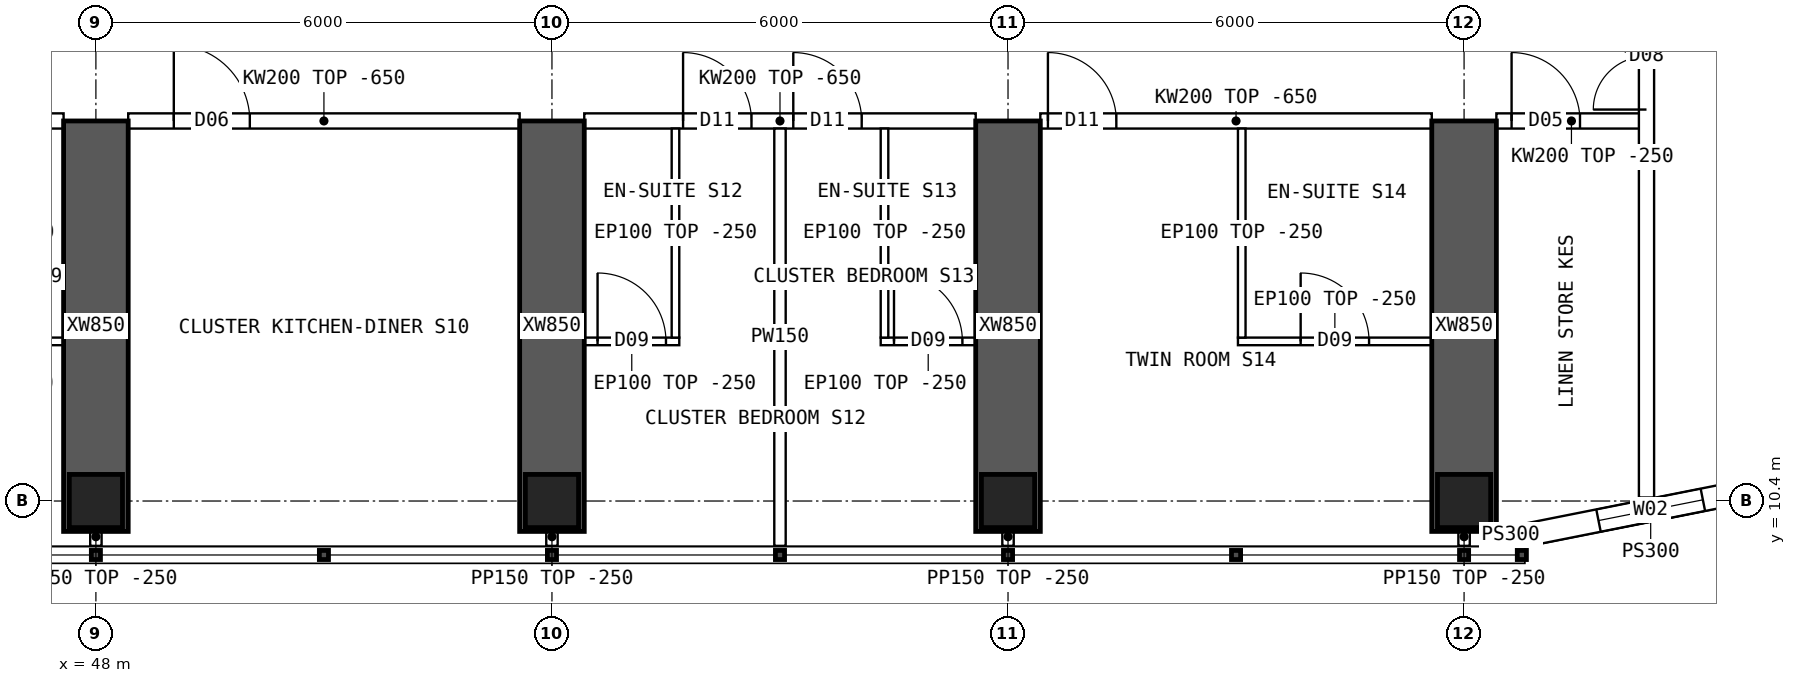
"""IFC4 building model, lengths in metres.
Left out: names, types, materials, properties, quantities, classifications, styles, units other than length and angle.
Written with IfcOpenShell. Run it as: python <this file> out.ifc"""

import sys

from ifc_helpers import new_model, si_unit, direction, frame, frame_2d, origin, origin_2d, place, context, subcontext, project, spatial, polyline, rectangle, hollow_rectangle, outline, extrude, element, fill, save


model = new_model("IFC4")
c1 = context("Model", 3, precision=1e-05, world=origin(), true_north=direction((0.0, 1.0)))
c2 = subcontext(c1, "Body", "Model", "MODEL_VIEW")
j1 = project(units=[si_unit("LENGTHUNIT", "METRE"), si_unit("PLANEANGLEUNIT", "RADIAN")], contexts=[c1])
p1 = place(None, origin())
s1 = spatial("IfcSite", under=j1, at=p1, CompositionType="ELEMENT")
p2 = place(p1, origin())
s2 = spatial("IfcBuilding", under=s1, at=p2, CompositionType="ELEMENT")
p3 = place(p2, frame((0.0, 0.0, 171.1)))
s3 = spatial("IfcBuildingStorey", under=s2, at=p3, CompositionType="ELEMENT", Elevation=171.1)
for number, where, z_axis, x_axis in (
    (1, (48.0, 10.4, 0.0), (0.0, 0.0, 1.0), (1.0, 0.0, 0.0)),
    (2, (54.0, 10.4, 0.0), (0.0, 0.0, 1.0), (1.0, 0.0, 0.0)),
    (3, (60.0, 10.4, 0.0), (0.0, 0.0, 1.0), (1.0, 0.0, 0.0)),
    (4, (66.0, 10.4, 0.0), (0.0, 0.0, 1.0), (1.0, 0.0, 0.0)),
):
    element("IfcColumn", number, at=place(p3, frame(where, z_axis=z_axis, x_axis=x_axis)), inside=s3, PredefinedType="COLUMN", context=c2, shape_type="SweptSolid", body=[
        extrude(hollow_rectangle(XDim=0.7, YDim=0.7, WallThickness=0.07, at=origin_2d()), origin(), (0.0, 0.0, 1.0), 3.75),
    ])
for number, where, z_axis, x_axis in (
    (5, (48.0, 10.0, 0.0), (0.0, 0.0, 1.0), (0.0, 1.0, 0.0)),
    (6, (54.0, 10.0, 0.0), (0.0, 0.0, 1.0), (0.0, 1.0, 0.0)),
    (7, (60.0, 10.0, 0.0), (0.0, 0.0, 1.0), (0.0, 1.0, 0.0)),
    (8, (66.0, 10.0, 0.0), (0.0, 0.0, 1.0), (0.0, 1.0, 0.0)),
):
    element("IfcWall", number, at=place(p3, frame(where, z_axis=z_axis, x_axis=x_axis)), inside=s3, PredefinedType="SHEAR", context=c2, shape_type="SweptSolid", body=[
        extrude(rectangle(XDim=5.4, YDim=0.85, at=frame_2d((2.7, 0.0))), origin(), (0.0, 0.0, 1.0), 3.75),
    ])
p4 = place(p3, frame((66.8, 9.95, 0.0), z_axis=(0.0, 0.0, 1.0), x_axis=(0.98078325777, 0.195100490205, 0.0)))
e9 = element("IfcWall", 9, at=p4, inside=s3, PredefinedType="SOLIDWALL", context=c2, shape_type="SweptSolid", body=[
    extrude(outline(polyline([(-0.03, -0.15), (3.405, -0.15), (3.345, 0.15), (0.03, 0.15), (-0.03, -0.15)])), origin(), (0.0, 0.0, 1.0), 3.5),
])
p5 = place(p4, frame((0.988, 0.0, 0.9)))
e10 = element("IfcOpeningElement", 10, at=p5, cuts=e9, PredefinedType="OPENING", context=c2, shape_type="SweptSolid", body=[
    extrude(rectangle(XDim=1.4, YDim=1.8, at=frame_2d((0.7, 0.9))), frame((0.0, 0.16, 0.0), z_axis=(0.0, -1.0, 0.0), x_axis=(1.0, 0.0, 0.0)), (0.0, 0.0, 1.0), 0.32),
])
p6 = place(p3, frame((66.8, 9.95, 0.0), z_axis=(0.0, 0.0, 1.0), x_axis=(-1.0, 0.0, 0.0)))
e11 = element("IfcWall", 11, at=p6, inside=s3, PredefinedType="SOLIDWALL", context=c2, shape_type="SweptSolid", body=[
    extrude(rectangle(XDim=0.375, YDim=0.3, at=frame_2d((0.188, 0.0))), origin(), (0.0, 0.0, 1.0), 3.5),
])
p7 = place(p3, frame((42.425, 15.4, 0.0), z_axis=(0.0, 0.0, 1.0), x_axis=(1.0, 0.0, 0.0)))
e12 = element("IfcWall", 12, at=p7, inside=s3, PredefinedType="SOLIDWALL", context=c2, shape_type="SweptSolid", body=[
    extrude(outline(polyline([(0.0, 0.0), (5.15, 0.0), (5.15, 3.1), (0.0, 3.1), (0.0, 0.0)])), frame((0.0, 0.1, 0.0), z_axis=(0.0, -1.0, 0.0), x_axis=(1.0, 0.0, 0.0)), (0.0, 0.0, 1.0), 0.2),
])
p8 = place(p7, frame((1.3, 0.0, 0.0)))
e13 = element("IfcOpeningElement", 13, at=p8, cuts=e12, PredefinedType="OPENING", context=c2, shape_type="SweptSolid", body=[
    extrude(rectangle(XDim=0.9, YDim=2.1, at=frame_2d((0.45, 1.05))), frame((0.0, 0.11, 0.0), z_axis=(0.0, -1.0, 0.0), x_axis=(1.0, 0.0, 0.0)), (0.0, 0.0, 1.0), 0.22),
])
p9 = place(p7, frame((2.75, 0.0, 0.0)))
e14 = element("IfcOpeningElement", 14, at=p9, cuts=e12, PredefinedType="OPENING", context=c2, shape_type="SweptSolid", body=[
    extrude(rectangle(XDim=0.9, YDim=2.1, at=frame_2d((0.45, 1.05))), frame((0.0, 0.11, 0.0), z_axis=(0.0, -1.0, 0.0), x_axis=(1.0, 0.0, 0.0)), (0.0, 0.0, 1.0), 0.22),
])
p10 = place(p3, frame((48.425, 15.4, 0.0), z_axis=(0.0, 0.0, 1.0), x_axis=(1.0, 0.0, 0.0)))
e15 = element("IfcWall", 15, at=p10, inside=s3, PredefinedType="SOLIDWALL", context=c2, shape_type="SweptSolid", body=[
    extrude(outline(polyline([(0.0, 0.0), (5.15, 0.0), (5.15, 3.1), (0.0, 3.1), (0.0, 0.0)])), frame((0.0, 0.1, 0.0), z_axis=(0.0, -1.0, 0.0), x_axis=(1.0, 0.0, 0.0)), (0.0, 0.0, 1.0), 0.2),
])
p11 = place(p10, frame((0.6, 0.0, 0.0)))
e16 = element("IfcOpeningElement", 16, at=p11, cuts=e15, PredefinedType="OPENING", context=c2, shape_type="SweptSolid", body=[
    extrude(rectangle(XDim=1.0, YDim=2.1, at=frame_2d((0.5, 1.05))), frame((0.0, 0.11, 0.0), z_axis=(0.0, -1.0, 0.0), x_axis=(1.0, 0.0, 0.0)), (0.0, 0.0, 1.0), 0.22),
])
p12 = place(p3, frame((54.425, 15.4, 0.0), z_axis=(0.0, 0.0, 1.0), x_axis=(1.0, 0.0, 0.0)))
e17 = element("IfcWall", 17, at=p12, inside=s3, PredefinedType="SOLIDWALL", context=c2, shape_type="SweptSolid", body=[
    extrude(outline(polyline([(0.0, 0.0), (5.15, 0.0), (5.15, 3.1), (0.0, 3.1), (0.0, 0.0)])), frame((0.0, 0.1, 0.0), z_axis=(0.0, -1.0, 0.0), x_axis=(1.0, 0.0, 0.0)), (0.0, 0.0, 1.0), 0.2),
])
p13 = place(p12, frame((1.3, 0.0, 0.0)))
e18 = element("IfcOpeningElement", 18, at=p13, cuts=e17, PredefinedType="OPENING", context=c2, shape_type="SweptSolid", body=[
    extrude(rectangle(XDim=0.9, YDim=2.1, at=frame_2d((0.45, 1.05))), frame((0.0, 0.11, 0.0), z_axis=(0.0, -1.0, 0.0), x_axis=(1.0, 0.0, 0.0)), (0.0, 0.0, 1.0), 0.22),
])
p14 = place(p12, frame((2.75, 0.0, 0.0)))
e19 = element("IfcOpeningElement", 19, at=p14, cuts=e17, PredefinedType="OPENING", context=c2, shape_type="SweptSolid", body=[
    extrude(rectangle(XDim=0.9, YDim=2.1, at=frame_2d((0.45, 1.05))), frame((0.0, 0.11, 0.0), z_axis=(0.0, -1.0, 0.0), x_axis=(1.0, 0.0, 0.0)), (0.0, 0.0, 1.0), 0.22),
])
p15 = place(p3, frame((60.425, 15.4, 0.0), z_axis=(0.0, 0.0, 1.0), x_axis=(1.0, 0.0, 0.0)))
e20 = element("IfcWall", 20, at=p15, inside=s3, PredefinedType="SOLIDWALL", context=c2, shape_type="SweptSolid", body=[
    extrude(outline(polyline([(0.0, 0.0), (5.15, 0.0), (5.15, 3.1), (0.0, 3.1), (0.0, 0.0)])), frame((0.0, 0.1, 0.0), z_axis=(0.0, -1.0, 0.0), x_axis=(1.0, 0.0, 0.0)), (0.0, 0.0, 1.0), 0.2),
])
p16 = place(p15, frame((0.1, 0.0, 0.0)))
e21 = element("IfcOpeningElement", 21, at=p16, cuts=e20, PredefinedType="OPENING", context=c2, shape_type="SweptSolid", body=[
    extrude(rectangle(XDim=0.9, YDim=2.1, at=frame_2d((0.45, 1.05))), frame((0.0, 0.11, 0.0), z_axis=(0.0, -1.0, 0.0), x_axis=(1.0, 0.0, 0.0)), (0.0, 0.0, 1.0), 0.22),
])
p17 = place(p3, frame((66.425, 15.4, 0.0), z_axis=(0.0, 0.0, 1.0), x_axis=(1.0, 0.0, 0.0)))
e22 = element("IfcWall", 22, at=p17, inside=s3, PredefinedType="SOLIDWALL", context=c2, shape_type="SweptSolid", body=[
    extrude(rectangle(XDim=1.975, YDim=0.2, at=frame_2d((0.987, 0.0))), origin(), (0.0, 0.0, 1.0), 3.5),
])
p18 = place(p17, frame((0.2, 0.0, 0.0)))
e23 = element("IfcOpeningElement", 23, at=p18, cuts=e22, PredefinedType="OPENING", context=c2, shape_type="SweptSolid", body=[
    extrude(rectangle(XDim=0.9, YDim=2.1, at=frame_2d((0.45, 1.05))), frame((0.0, 0.11, 0.0), z_axis=(0.0, -1.0, 0.0), x_axis=(1.0, 0.0, 0.0)), (0.0, 0.0, 1.0), 0.22),
])
p19 = place(p3, frame((47.575, 12.5, 0.0), z_axis=(0.0, 0.0, 1.0), x_axis=(-1.0, 0.0, 0.0)))
e24 = element("IfcWall", 24, at=p19, inside=s3, PredefinedType="PARTITIONING", context=c2, shape_type="SweptSolid", body=[
    extrude(rectangle(XDim=1.25, YDim=0.1, at=frame_2d((0.625, 0.0))), origin(), (0.0, 0.0, 1.0), 3.5),
])
p20 = place(p19, frame((0.175, 0.0, 0.0)))
e25 = element("IfcOpeningElement", 25, at=p20, cuts=e24, PredefinedType="OPENING", context=c2, shape_type="SweptSolid", body=[
    extrude(rectangle(XDim=0.9, YDim=2.1, at=frame_2d((0.45, 1.05))), frame((0.0, 0.06, 0.0), z_axis=(0.0, -1.0, 0.0), x_axis=(1.0, 0.0, 0.0)), (0.0, 0.0, 1.0), 0.12),
])
p21 = place(p3, frame((57.0, 9.81, 0.0), z_axis=(0.0, 0.0, 1.0), x_axis=(0.0, 1.0, 0.0)))
e26 = element("IfcWall", 26, at=p21, inside=s3, PredefinedType="PARTITIONING", context=c2, shape_type="SweptSolid", body=[
    extrude(outline(polyline([(0.0, 0.0), (5.49, 0.0), (5.49, 3.1), (5.442, 3.1), (5.44, 3.5), (0.792, 3.5), (0.79, 3.1), (0.392, 3.1), (0.39, 3.5), (0.0, 3.5), (0.0, 0.0)])), frame((0.0, 0.075, 0.0), z_axis=(0.0, -1.0, 0.0), x_axis=(1.0, 0.0, 0.0)), (0.0, 0.0, 1.0), 0.15),
])
p22 = place(p3, frame((55.675, 12.5, 0.0), z_axis=(0.0, 0.0, 1.0), x_axis=(-1.0, 0.0, 0.0)))
e27 = element("IfcWall", 27, at=p22, inside=s3, PredefinedType="PARTITIONING", context=c2, shape_type="SweptSolid", body=[
    extrude(rectangle(XDim=1.25, YDim=0.1, at=frame_2d((0.625, 0.0))), origin(), (0.0, 0.0, 1.0), 3.5),
])
p23 = place(p22, frame((0.175, 0.0, 0.0)))
e28 = element("IfcOpeningElement", 28, at=p23, cuts=e27, PredefinedType="OPENING", context=c2, shape_type="SweptSolid", body=[
    extrude(rectangle(XDim=0.9, YDim=2.1, at=frame_2d((0.45, 1.05))), frame((0.0, 0.06, 0.0), z_axis=(0.0, -1.0, 0.0), x_axis=(1.0, 0.0, 0.0)), (0.0, 0.0, 1.0), 0.12),
])
p24 = place(p3, frame((55.625, 12.55, 0.0), z_axis=(0.0, 0.0, 1.0), x_axis=(0.0, 1.0, 0.0)))
e29 = element("IfcWall", 29, at=p24, inside=s3, PredefinedType="PARTITIONING", context=c2, shape_type="SweptSolid", body=[
    extrude(outline(polyline([(0.0, 0.0), (2.75, 0.0), (2.75, 3.1), (2.702, 3.1), (2.7, 3.5), (0.0, 3.5), (0.0, 0.0)])), frame((0.0, 0.05, 0.0), z_axis=(0.0, -1.0, 0.0), x_axis=(1.0, 0.0, 0.0)), (0.0, 0.0, 1.0), 0.1),
])
p25 = place(p3, frame((59.575, 12.5, 0.0), z_axis=(0.0, 0.0, 1.0), x_axis=(-1.0, 0.0, 0.0)))
e30 = element("IfcWall", 30, at=p25, inside=s3, PredefinedType="PARTITIONING", context=c2, shape_type="SweptSolid", body=[
    extrude(rectangle(XDim=1.25, YDim=0.1, at=frame_2d((0.625, 0.0))), origin(), (0.0, 0.0, 1.0), 3.5),
])
p26 = place(p25, frame((0.175, 0.0, 0.0)))
e31 = element("IfcOpeningElement", 31, at=p26, cuts=e30, PredefinedType="OPENING", context=c2, shape_type="SweptSolid", body=[
    extrude(rectangle(XDim=0.9, YDim=2.1, at=frame_2d((0.45, 1.05))), frame((0.0, 0.06, 0.0), z_axis=(0.0, -1.0, 0.0), x_axis=(1.0, 0.0, 0.0)), (0.0, 0.0, 1.0), 0.12),
])
p27 = place(p3, frame((58.375, 12.55, 0.0), z_axis=(0.0, 0.0, 1.0), x_axis=(0.0, 1.0, 0.0)))
e32 = element("IfcWall", 32, at=p27, inside=s3, PredefinedType="PARTITIONING", context=c2, shape_type="SweptSolid", body=[
    extrude(outline(polyline([(0.0, 0.0), (2.75, 0.0), (2.75, 3.1), (2.702, 3.1), (2.7, 3.5), (0.0, 3.5), (0.0, 0.0)])), frame((0.0, 0.05, 0.0), z_axis=(0.0, -1.0, 0.0), x_axis=(1.0, 0.0, 0.0)), (0.0, 0.0, 1.0), 0.1),
])
p28 = place(p3, frame((65.575, 12.5, 0.0), z_axis=(0.0, 0.0, 1.0), x_axis=(-1.0, 0.0, 0.0)))
e33 = element("IfcWall", 33, at=p28, inside=s3, PredefinedType="PARTITIONING", context=c2, shape_type="SweptSolid", body=[
    extrude(rectangle(XDim=2.55, YDim=0.1, at=frame_2d((1.275, 0.0))), origin(), (0.0, 0.0, 1.0), 3.5),
])
p29 = place(p28, frame((0.825, 0.0, 0.0)))
e34 = element("IfcOpeningElement", 34, at=p29, cuts=e33, PredefinedType="OPENING", context=c2, shape_type="SweptSolid", body=[
    extrude(rectangle(XDim=0.9, YDim=2.1, at=frame_2d((0.45, 1.05))), frame((0.0, 0.06, 0.0), z_axis=(0.0, -1.0, 0.0), x_axis=(1.0, 0.0, 0.0)), (0.0, 0.0, 1.0), 0.12),
])
p30 = place(p3, frame((63.075, 12.55, 0.0), z_axis=(0.0, 0.0, 1.0), x_axis=(0.0, 1.0, 0.0)))
e35 = element("IfcWall", 35, at=p30, inside=s3, PredefinedType="PARTITIONING", context=c2, shape_type="SweptSolid", body=[
    extrude(outline(polyline([(0.0, 0.0), (2.75, 0.0), (2.75, 3.1), (2.702, 3.1), (2.7, 3.5), (0.0, 3.5), (0.0, 0.0)])), frame((0.0, 0.05, 0.0), z_axis=(0.0, -1.0, 0.0), x_axis=(1.0, 0.0, 0.0)), (0.0, 0.0, 1.0), 0.1),
])
p31 = place(p3, frame((68.4, 10.446, 0.0), z_axis=(0.0, 0.0, 1.0), x_axis=(0.0, 1.0, 0.0)))
e36 = element("IfcWall", 36, at=p31, inside=s3, PredefinedType="SOLIDWALL", context=c2, shape_type="SweptSolid", body=[
    extrude(rectangle(XDim=43.107, YDim=0.2, at=frame_2d((21.554, 0.0))), origin(), (0.0, 0.0, 1.0), 3.5),
])
p32 = place(p31, frame((13.914, 0.0, 0.0)))
e37 = element("IfcOpeningElement", 37, at=p32, cuts=e36, PredefinedType="OPENING", context=c2, shape_type="SweptSolid", body=[
    extrude(rectangle(XDim=1.2, YDim=2.1, at=frame_2d((0.6, 1.05))), frame((0.0, 0.11, 0.0), z_axis=(0.0, -1.0, 0.0), x_axis=(1.0, 0.0, 0.0)), (0.0, 0.0, 1.0), 0.22),
])
p33 = place(p31, frame((22.634, 0.0, 0.0)))
e38 = element("IfcOpeningElement", 38, at=p33, cuts=e36, PredefinedType="OPENING", context=c2, shape_type="SweptSolid", body=[
    extrude(rectangle(XDim=1.2, YDim=2.1, at=frame_2d((0.6, 1.05))), frame((0.0, 0.11, 0.0), z_axis=(0.0, -1.0, 0.0), x_axis=(1.0, 0.0, 0.0)), (0.0, 0.0, 1.0), 0.22),
])
p34 = place(p31, frame((5.104, 0.0, 0.0)))
e39 = element("IfcOpeningElement", 39, at=p34, cuts=e36, PredefinedType="OPENING", context=c2, shape_type="SweptSolid", body=[
    extrude(rectangle(XDim=1.4, YDim=2.1, at=frame_2d((0.7, 1.05))), frame((0.0, 0.11, 0.0), z_axis=(0.0, -1.0, 0.0), x_axis=(1.0, 0.0, 0.0)), (0.0, 0.0, 1.0), 0.22),
])
p35 = place(p31, frame((36.504, 0.0, 0.0)))
e40 = element("IfcOpeningElement", 40, at=p35, cuts=e36, PredefinedType="OPENING", context=c2, shape_type="SweptSolid", body=[
    extrude(rectangle(XDim=1.4, YDim=2.1, at=frame_2d((0.7, 1.05))), frame((0.0, 0.11, 0.0), z_axis=(0.0, -1.0, 0.0), x_axis=(1.0, 0.0, 0.0)), (0.0, 0.0, 1.0), 0.22),
])
for number, where, z_axis, x_axis in (
    (41, (48.0, 10.05, 0.0), (0.0, 0.0, 1.0), (0.0, -1.0, 0.0)),
    (42, (54.0, 10.05, 0.0), (0.0, 0.0, 1.0), (0.0, -1.0, 0.0)),
    (43, (60.0, 10.05, 0.0), (0.0, 0.0, 1.0), (0.0, -1.0, 0.0)),
    (44, (66.0, 10.05, 0.0), (0.0, 0.0, 1.0), (0.0, -1.0, 0.0)),
):
    element("IfcWall", number, at=place(p3, frame(where, z_axis=z_axis, x_axis=x_axis)), inside=s3, PredefinedType="PARTITIONING", context=c2, shape_type="SweptSolid", body=[
        extrude(rectangle(XDim=0.24, YDim=0.15, at=frame_2d((0.12, 0.0))), origin(), (0.0, 0.0, 1.0), 3.5),
    ])
p36 = place(p5, origin())
e45 = element("IfcWindow", 45, at=p36, inside=s3, PartitioningType="SINGLE_PANEL", PredefinedType="WINDOW", context=c2, shape_type="SweptSolid", body=[
    extrude(rectangle(XDim=1.4, YDim=1.8, at=frame_2d((0.7, 0.9))), frame((0.0, 0.03, 0.0), z_axis=(0.0, -1.0, 0.0), x_axis=(1.0, 0.0, 0.0)), (0.0, 0.0, 1.0), 0.06),
])
fill(e10, e45)
p37 = place(p11, origin())
e46 = element("IfcDoor", 46, at=p37, inside=s3, OperationType="SINGLE_SWING_LEFT", PredefinedType="DOOR", context=c2, shape_type="SweptSolid", body=[
    extrude(rectangle(XDim=1.0, YDim=2.1, at=frame_2d((0.5, 1.05))), frame((0.0, 0.025, 0.0), z_axis=(0.0, -1.0, 0.0), x_axis=(1.0, 0.0, 0.0)), (0.0, 0.0, 1.0), 0.05),
])
fill(e16, e46)
p38 = place(p23, origin())
e47 = element("IfcDoor", 47, at=p38, inside=s3, OperationType="SINGLE_SWING_RIGHT", PredefinedType="DOOR", context=c2, shape_type="SweptSolid", body=[
    extrude(rectangle(XDim=0.9, YDim=2.1, at=frame_2d((0.45, 1.05))), frame((0.0, 0.025, 0.0), z_axis=(0.0, -1.0, 0.0), x_axis=(1.0, 0.0, 0.0)), (0.0, 0.0, 1.0), 0.05),
])
fill(e28, e47)
p39 = place(p13, origin())
e48 = element("IfcDoor", 48, at=p39, inside=s3, OperationType="SINGLE_SWING_LEFT", PredefinedType="DOOR", context=c2, shape_type="SweptSolid", body=[
    extrude(rectangle(XDim=0.9, YDim=2.1, at=frame_2d((0.45, 1.05))), frame((0.0, 0.025, 0.0), z_axis=(0.0, -1.0, 0.0), x_axis=(1.0, 0.0, 0.0)), (0.0, 0.0, 1.0), 0.05),
])
fill(e18, e48)
p40 = place(p26, origin())
e49 = element("IfcDoor", 49, at=p40, inside=s3, OperationType="SINGLE_SWING_RIGHT", PredefinedType="DOOR", context=c2, shape_type="SweptSolid", body=[
    extrude(rectangle(XDim=0.9, YDim=2.1, at=frame_2d((0.45, 1.05))), frame((0.0, 0.025, 0.0), z_axis=(0.0, -1.0, 0.0), x_axis=(1.0, 0.0, 0.0)), (0.0, 0.0, 1.0), 0.05),
])
fill(e31, e49)
p41 = place(p14, origin())
e50 = element("IfcDoor", 50, at=p41, inside=s3, OperationType="SINGLE_SWING_LEFT", PredefinedType="DOOR", context=c2, shape_type="SweptSolid", body=[
    extrude(rectangle(XDim=0.9, YDim=2.1, at=frame_2d((0.45, 1.05))), frame((0.0, 0.025, 0.0), z_axis=(0.0, -1.0, 0.0), x_axis=(1.0, 0.0, 0.0)), (0.0, 0.0, 1.0), 0.05),
])
fill(e19, e50)
p42 = place(p29, origin())
e51 = element("IfcDoor", 51, at=p42, inside=s3, OperationType="SINGLE_SWING_RIGHT", PredefinedType="DOOR", context=c2, shape_type="SweptSolid", body=[
    extrude(rectangle(XDim=0.9, YDim=2.1, at=frame_2d((0.45, 1.05))), frame((0.0, 0.025, 0.0), z_axis=(0.0, -1.0, 0.0), x_axis=(1.0, 0.0, 0.0)), (0.0, 0.0, 1.0), 0.05),
])
fill(e34, e51)
p43 = place(p16, origin())
e52 = element("IfcDoor", 52, at=p43, inside=s3, OperationType="SINGLE_SWING_LEFT", PredefinedType="DOOR", context=c2, shape_type="SweptSolid", body=[
    extrude(rectangle(XDim=0.9, YDim=2.1, at=frame_2d((0.45, 1.05))), frame((0.0, 0.025, 0.0), z_axis=(0.0, -1.0, 0.0), x_axis=(1.0, 0.0, 0.0)), (0.0, 0.0, 1.0), 0.05),
])
fill(e21, e52)
p44 = place(p34, origin())
e53 = element("IfcDoor", 53, at=p44, inside=s3, OperationType="DOUBLE_DOOR_SINGLE_SWING", PredefinedType="DOOR", context=c2, shape_type="SweptSolid", body=[
    extrude(rectangle(XDim=1.4, YDim=2.1, at=frame_2d((0.7, 1.05))), frame((0.0, 0.025, 0.0), z_axis=(0.0, -1.0, 0.0), x_axis=(1.0, 0.0, 0.0)), (0.0, 0.0, 1.0), 0.05),
])
fill(e39, e53)
p45 = place(p18, origin())
e54 = element("IfcDoor", 54, at=p45, inside=s3, OperationType="SINGLE_SWING_LEFT", PredefinedType="DOOR", context=c2, shape_type="SweptSolid", body=[
    extrude(rectangle(XDim=0.9, YDim=2.1, at=frame_2d((0.45, 1.05))), frame((0.0, 0.025, 0.0), z_axis=(0.0, -1.0, 0.0), x_axis=(1.0, 0.0, 0.0)), (0.0, 0.0, 1.0), 0.05),
])
fill(e23, e54)
save(model, sys.argv[1])
